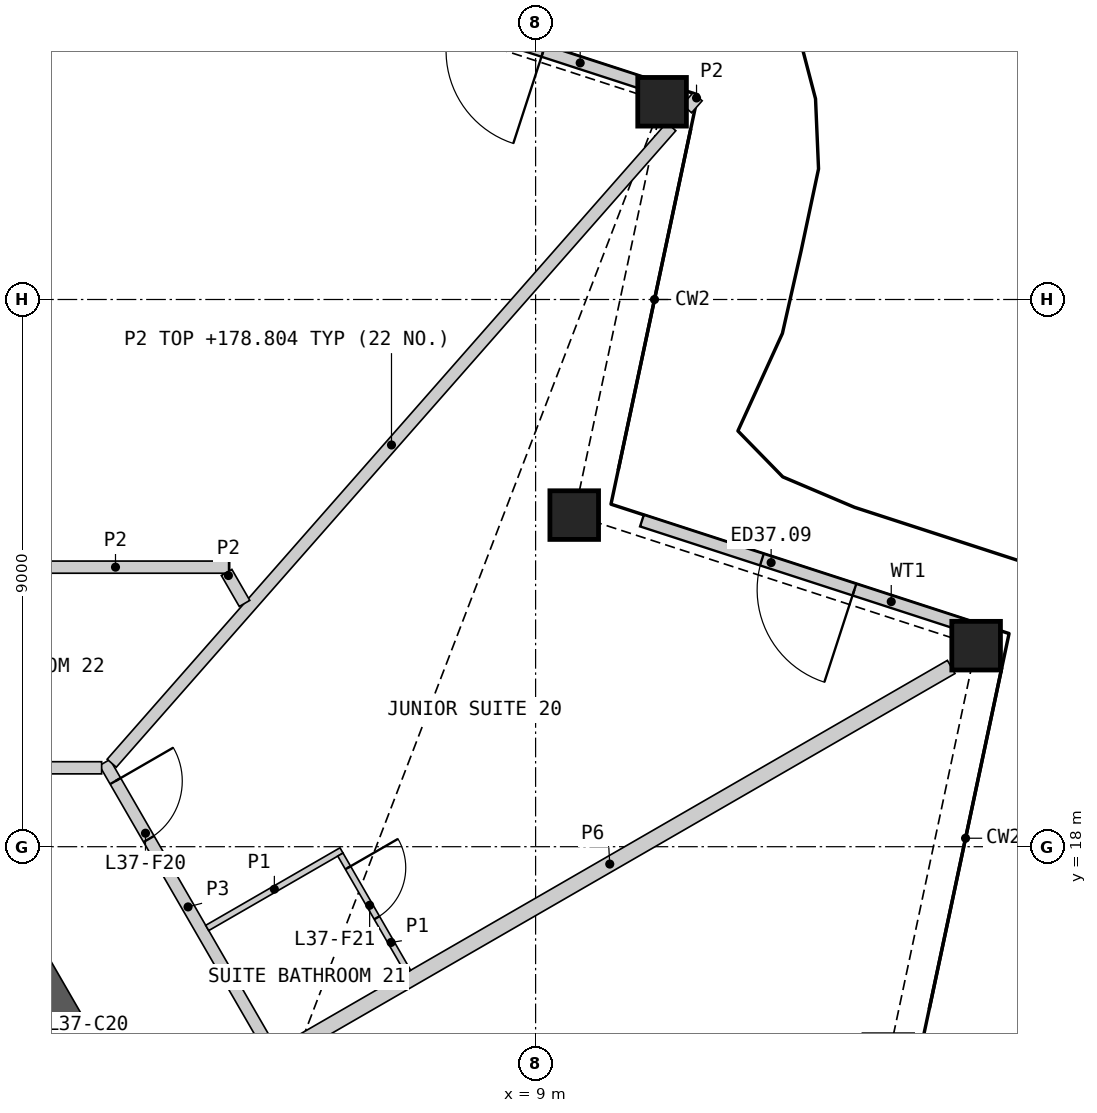
"""IFC4 building model, lengths in metres.
Left out: names, types, materials, properties, quantities, classifications, styles, units other than length and angle.
Written with IfcOpenShell. Run it as: python <this file> out.ifc"""

import sys

from ifc_helpers import new_model, si_unit, direction, frame, frame_2d, origin, origin_2d, place, context, subcontext, project, spatial, rectangle, hollow_rectangle, extrude, element, fill, save


model = new_model("IFC4")
c1 = context("Model", 3, precision=1e-05, world=origin(), true_north=direction((0.0, 1.0)))
c2 = subcontext(c1, "Body", "Model", "MODEL_VIEW")
j1 = project(units=[si_unit("LENGTHUNIT", "METRE"), si_unit("PLANEANGLEUNIT", "RADIAN")], contexts=[c1])
p1 = place(None, origin())
s1 = spatial("IfcSite", under=j1, at=p1, CompositionType="ELEMENT")
p2 = place(p1, origin())
s2 = spatial("IfcBuilding", under=s1, at=p2, CompositionType="ELEMENT")
p3 = place(p2, frame((0.0, 0.0, 176.4)))
s3 = spatial("IfcBuildingStorey", under=s2, at=p3, CompositionType="ELEMENT", Elevation=176.4)
for number, where, z_axis, x_axis in (
    (1, (16.245, 21.306, 0.0), (0.0, 0.0, 1.0), (1.0, 0.0, 0.0)),
    (2, (9.635, 23.454, 0.0), (0.0, 0.0, 1.0), (1.0, 0.0, 0.0)),
    (3, (11.08, 30.252, 0.0), (0.0, 0.0, 1.0), (1.0, 0.0, 0.0)),
):
    element("IfcColumn", number, at=place(p3, frame(where, z_axis=z_axis, x_axis=x_axis)), inside=s3, PredefinedType="COLUMN", context=c2, shape_type="SweptSolid", body=[
        extrude(hollow_rectangle(XDim=0.8, YDim=0.8, WallThickness=0.05, at=origin_2d()), origin(), (0.0, 0.0, 1.0), 3.6),
    ])
p4 = place(p3, frame((16.216, 21.586, 0.0), z_axis=(0.0, 0.0, 1.0), x_axis=(-0.95105997304, 0.309006355405, 0.0)))
e4 = element("IfcWall", 4, at=p4, inside=s3, PredefinedType="SOLIDWALL", context=c2, shape_type="SweptSolid", body=[
    extrude(rectangle(XDim=5.748, YDim=0.2, at=frame_2d((2.874, 0.0))), origin(), (0.0, 0.0, 1.0), 2.701),
])
p5 = place(p4, frame((2.074, 0.0, 0.0)))
e5 = element("IfcOpeningElement", 5, at=p5, cuts=e4, PredefinedType="OPENING", context=c2, shape_type="SweptSolid", body=[
    extrude(rectangle(XDim=1.6, YDim=2.4, at=frame_2d((0.8, 1.2))), frame((0.0, 0.11, 0.0), z_axis=(0.0, -1.0, 0.0), x_axis=(1.0, 0.0, 0.0)), (0.0, 0.0, 1.0), 0.22),
])
p6 = place(p3, frame((11.1, 30.447, 0.0), z_axis=(0.0, 0.0, 1.0), x_axis=(-0.95105997304, 0.309006355405, 0.0)))
e6 = element("IfcWall", 6, at=p6, inside=s3, PredefinedType="SOLIDWALL", context=c2, shape_type="SweptSolid", body=[
    extrude(rectangle(XDim=5.748, YDim=0.2, at=frame_2d((2.874, 0.0))), origin(), (0.0, 0.0, 1.0), 2.701),
])
p7 = place(p6, frame((2.074, 0.0, 0.0)))
e7 = element("IfcOpeningElement", 7, at=p7, cuts=e6, PredefinedType="OPENING", context=c2, shape_type="SweptSolid", body=[
    extrude(rectangle(XDim=1.6, YDim=2.4, at=frame_2d((0.8, 1.2))), frame((0.0, 0.11, 0.0), z_axis=(0.0, -1.0, 0.0), x_axis=(1.0, 0.0, 0.0)), (0.0, 0.0, 1.0), 0.22),
])
p8 = place(p3, frame((1.286, 14.92, 0.0), z_axis=(0.0, 0.0, 1.0), x_axis=(-0.500030129425, 0.866008007854, 0.0)))
e8 = element("IfcWall", 8, at=p8, inside=s3, PredefinedType="SHEAR", context=c2, shape_type="SweptSolid", body=[
    extrude(rectangle(XDim=1.923, YDim=0.75, at=frame_2d((0.962, 0.0))), origin(), (0.0, 0.0, 1.0), 3.25),
])
p9 = place(p3, frame((2.386, 13.015, 0.0), z_axis=(0.0, 0.0, 1.0), x_axis=(-0.499946605688, 0.86605622881, 0.0)))
e9 = element("IfcWall", 9, at=p9, inside=s3, PredefinedType="SHEAR", context=c2, shape_type="SweptSolid", body=[
    extrude(rectangle(XDim=2.2, YDim=0.75, at=frame_2d((1.1, 0.0))), origin(), (0.0, 0.0, 1.0), 3.25),
])
p10 = place(p9, frame((0.6, 0.0, 0.0)))
e10 = element("IfcOpeningElement", 10, at=p10, cuts=e9, PredefinedType="OPENING", context=c2, shape_type="SweptSolid", body=[
    extrude(rectangle(XDim=1.0, YDim=2.1, at=frame_2d((0.5, 1.05))), frame((0.0, 0.385, 0.0), z_axis=(0.0, -1.0, 0.0), x_axis=(1.0, 0.0, 0.0)), (0.0, 0.0, 1.0), 0.77),
])
p11 = place(p3, frame((4.604, 14.473, 0.0), z_axis=(0.0, 0.0, 1.0), x_axis=(0.866029765546, 0.499992445131, 0.0)))
e11 = element("IfcWall", 11, at=p11, inside=s3, PredefinedType="PARTITIONING", context=c2, shape_type="SweptSolid", body=[
    extrude(rectangle(XDim=12.968, YDim=0.25, at=frame_2d((6.484, 0.0))), origin(), (0.0, 0.0, 1.0), 2.404),
])
p12 = place(p3, frame((1.913, 19.385, 0.0), z_axis=(0.0, 0.0, 1.0), x_axis=(0.499988331988, -0.866032140209, 0.0)))
e12 = element("IfcWall", 12, at=p12, inside=s3, PredefinedType="PARTITIONING", context=c2, shape_type="SweptSolid", body=[
    extrude(rectangle(XDim=5.485, YDim=0.2, at=frame_2d((2.742, 0.0))), origin(), (0.0, 0.0, 1.0), 3.25),
])
p13 = place(p12, frame((0.352, 0.0, 0.0)))
e13 = element("IfcOpeningElement", 13, at=p13, cuts=e12, PredefinedType="OPENING", context=c2, shape_type="SweptSolid", body=[
    extrude(rectangle(XDim=1.1, YDim=2.1, at=frame_2d((0.55, 1.05))), frame((0.0, 0.11, 0.0), z_axis=(0.0, -1.0, 0.0), x_axis=(1.0, 0.0, 0.0)), (0.0, 0.0, 1.0), 0.22),
])
p14 = place(p3, frame((-1.863, 19.298, 0.0), z_axis=(0.0, 0.0, 1.0), x_axis=(1.0, 0.0, 0.0)))
e14 = element("IfcWall", 14, at=p14, inside=s3, PredefinedType="PARTITIONING", context=c2, shape_type="SweptSolid", body=[
    extrude(rectangle(XDim=3.726, YDim=0.2, at=frame_2d((1.863, 0.0))), origin(), (0.0, 0.0, 1.0), 3.25),
])
p15 = place(p14, frame((1.388, 0.0, 0.0)))
e15 = element("IfcOpeningElement", 15, at=p15, cuts=e14, PredefinedType="OPENING", context=c2, shape_type="SweptSolid", body=[
    extrude(rectangle(XDim=0.95, YDim=2.1, at=frame_2d((0.475, 1.05))), frame((0.0, 0.11, 0.0), z_axis=(0.0, -1.0, 0.0), x_axis=(1.0, 0.0, 0.0)), (0.0, 0.0, 1.0), 0.22),
])
p16 = place(p3, frame((2.029, 19.373, 0.0), z_axis=(0.0, 0.0, 1.0), x_axis=(0.66019067586, 0.751098043871, 0.0)))
e16 = element("IfcWall", 16, at=p16, inside=s3, PredefinedType="PARTITIONING", context=c2, shape_type="SweptSolid", body=[
    extrude(rectangle(XDim=13.938, YDim=0.2, at=frame_2d((6.969, 0.0))), origin(), (0.0, 0.0, 1.0), 2.404),
])
p17 = place(p3, frame((0.214, 22.598, 0.0), z_axis=(0.0, 0.0, 1.0), x_axis=(1.0, 0.0, 0.0)))
e17 = element("IfcWall", 17, at=p17, inside=s3, PredefinedType="PARTITIONING", context=c2, shape_type="SweptSolid", body=[
    extrude(rectangle(XDim=3.755, YDim=0.2, at=frame_2d((1.877, 0.0))), origin(), (0.0, 0.0, 1.0), 2.404),
])
p18 = place(p3, frame((3.918, 22.511, 0.0), z_axis=(0.0, 0.0, 1.0), x_axis=(0.500105011351, -0.865964766963, 0.0)))
e18 = element("IfcWall", 18, at=p18, inside=s3, PredefinedType="PARTITIONING", context=c2, shape_type="SweptSolid", body=[
    extrude(rectangle(XDim=0.589, YDim=0.2, at=frame_2d((0.294, 0.0))), origin(), (0.0, 0.0, 1.0), 2.404),
])
p19 = place(p3, frame((11.49, 30.137, 0.0), z_axis=(0.0, 0.0, 1.0), x_axis=(0.660272933047, 0.751025734503, 0.0)))
e19 = element("IfcWall", 19, at=p19, inside=s3, PredefinedType="PARTITIONING", context=c2, shape_type="SweptSolid", body=[
    extrude(rectangle(XDim=0.264, YDim=0.2, at=frame_2d((0.132, 0.0))), origin(), (0.0, 0.0, 1.0), 2.404),
])
p20 = place(p3, frame((3.599, 16.664, 0.0), z_axis=(0.0, 0.0, 1.0), x_axis=(0.865989465428, 0.500062241894, 0.0)))
e20 = element("IfcWall", 20, at=p20, inside=s3, PredefinedType="PARTITIONING", context=c2, shape_type="SweptSolid", body=[
    extrude(rectangle(XDim=2.55, YDim=0.1, at=frame_2d((1.275, 0.0))), origin(), (0.0, 0.0, 1.0), 2.404),
])
p21 = place(p3, frame((5.789, 17.87, 0.0), z_axis=(0.0, 0.0, 1.0), x_axis=(0.49999788721, -0.866026623601, 0.0)))
e21 = element("IfcWall", 21, at=p21, inside=s3, PredefinedType="PARTITIONING", context=c2, shape_type="SweptSolid", body=[
    extrude(rectangle(XDim=2.225, YDim=0.1, at=frame_2d((1.113, 0.0))), origin(), (0.0, 0.0, 1.0), 2.404),
])
p22 = place(p21, frame((0.25, 0.0, 0.0)))
e22 = element("IfcOpeningElement", 22, at=p22, cuts=e21, PredefinedType="OPENING", context=c2, shape_type="SweptSolid", body=[
    extrude(rectangle(XDim=0.95, YDim=2.1, at=frame_2d((0.475, 1.05))), frame((0.0, 0.06, 0.0), z_axis=(0.0, -1.0, 0.0), x_axis=(1.0, 0.0, 0.0)), (0.0, 0.0, 1.0), 0.12),
])
p23 = place(p5, origin())
e23 = element("IfcDoor", 23, at=p23, inside=s3, OperationType="DOUBLE_DOOR_SINGLE_SWING", PredefinedType="DOOR", context=c2, shape_type="SweptSolid", body=[
    extrude(rectangle(XDim=1.6, YDim=2.4, at=frame_2d((0.8, 1.2))), frame((0.0, 0.025, 0.0), z_axis=(0.0, -1.0, 0.0), x_axis=(1.0, 0.0, 0.0)), (0.0, 0.0, 1.0), 0.05),
])
fill(e5, e23)
p24 = place(p7, origin())
e24 = element("IfcDoor", 24, at=p24, inside=s3, OperationType="DOUBLE_DOOR_SINGLE_SWING", PredefinedType="DOOR", context=c2, shape_type="SweptSolid", body=[
    extrude(rectangle(XDim=1.6, YDim=2.4, at=frame_2d((0.8, 1.2))), frame((0.0, 0.025, 0.0), z_axis=(0.0, -1.0, 0.0), x_axis=(1.0, 0.0, 0.0)), (0.0, 0.0, 1.0), 0.05),
])
fill(e7, e24)
p25 = place(p13, origin())
e25 = element("IfcDoor", 25, at=p25, inside=s3, OperationType="SINGLE_SWING_LEFT", PredefinedType="DOOR", context=c2, shape_type="SweptSolid", body=[
    extrude(rectangle(XDim=1.1, YDim=2.1, at=frame_2d((0.55, 1.05))), frame((0.0, 0.025, 0.0), z_axis=(0.0, -1.0, 0.0), x_axis=(1.0, 0.0, 0.0)), (0.0, 0.0, 1.0), 0.05),
])
fill(e13, e25)
p26 = place(p22, origin())
e26 = element("IfcDoor", 26, at=p26, inside=s3, OperationType="SINGLE_SWING_LEFT", PredefinedType="DOOR", context=c2, shape_type="SweptSolid", body=[
    extrude(rectangle(XDim=0.95, YDim=2.1, at=frame_2d((0.475, 1.05))), frame((0.0, 0.025, 0.0), z_axis=(0.0, -1.0, 0.0), x_axis=(1.0, 0.0, 0.0)), (0.0, 0.0, 1.0), 0.05),
])
fill(e22, e26)
save(model, sys.argv[1])
